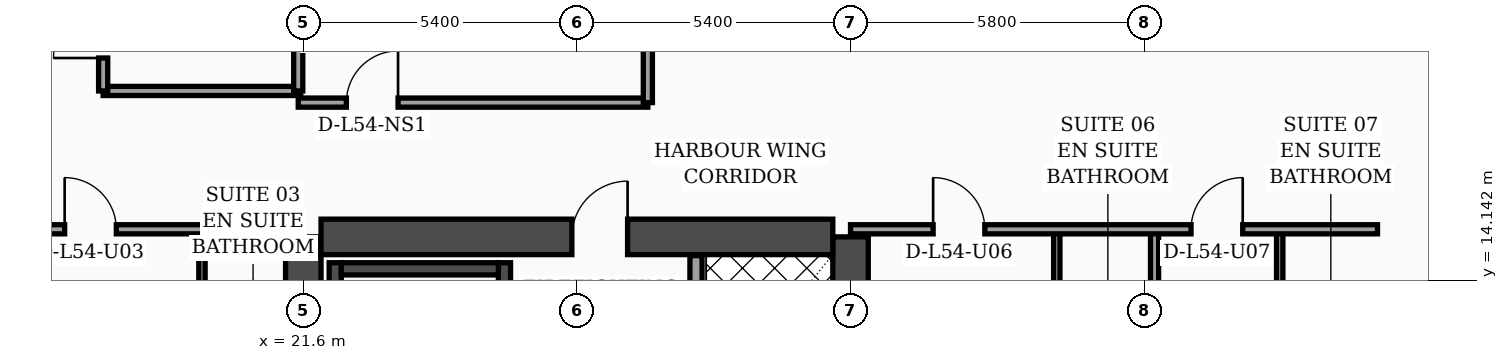
"""IFC4 building model, lengths in metres.
Left out: names, types, materials, properties, quantities, classifications, styles, units other than length and angle.
Written with IfcOpenShell. Run it as: python <this file> out.ifc"""

import sys

from ifc_helpers import new_model, si_unit, direction, frame, frame_2d, origin, place, context, subcontext, project, spatial, rectangle, extrude, element, fill, save


model = new_model("IFC4")
c1 = context("Model", 3, precision=1e-05, world=origin(), true_north=direction((0.0, 1.0)))
c2 = subcontext(c1, "Body", "Model", "MODEL_VIEW")
j1 = project(units=[si_unit("LENGTHUNIT", "METRE"), si_unit("PLANEANGLEUNIT", "RADIAN")], contexts=[c1])
p1 = place(None, origin())
s1 = spatial("IfcSite", under=j1, at=p1, CompositionType="ELEMENT")
p2 = place(p1, origin())
s2 = spatial("IfcBuilding", under=s1, at=p2, CompositionType="ELEMENT")
p3 = place(p2, frame((0.0, 0.0, 219.3)))
s3 = spatial("IfcBuildingStorey", under=s2, at=p3, CompositionType="ELEMENT", Elevation=219.3)
for number, where, z_axis, x_axis in (
    (1, (21.6, 4.6, 0.0), (0.0, 0.0, 1.0), (0.0, 1.0, 0.0)),
    (2, (32.4, 4.6, 0.0), (0.0, 0.0, 1.0), (0.0, 1.0, 0.0)),
):
    element("IfcWall", number, at=place(p3, frame(where, z_axis=z_axis, x_axis=x_axis)), inside=s3, PredefinedType="SHEAR", context=c2, shape_type="SweptSolid", body=[
        extrude(rectangle(XDim=10.4, YDim=0.7, at=frame_2d((5.2, 0.0))), origin(), (0.0, 0.0, 1.0), 3.56),
    ])
p4 = place(p3, frame((21.95, 15.0, 0.0), z_axis=(0.0, 0.0, 1.0), x_axis=(1.0, 0.0, 0.0)))
e3 = element("IfcWall", 3, at=p4, inside=s3, PredefinedType="SHEAR", context=c2, shape_type="SweptSolid", body=[
    extrude(rectangle(XDim=10.1, YDim=0.7, at=frame_2d((5.05, 0.0))), origin(), (0.0, 0.0, 1.0), 3.56),
])
p5 = place(p4, frame((4.95, 0.0, 0.0)))
e4 = element("IfcOpeningElement", 4, at=p5, cuts=e3, PredefinedType="OPENING", context=c2, shape_type="SweptSolid", body=[
    extrude(rectangle(XDim=1.1, YDim=2.2, at=frame_2d((0.55, 1.1))), frame((0.0, 0.36, 0.0), z_axis=(0.0, -1.0, 0.0), x_axis=(1.0, 0.0, 0.0)), (0.0, 0.0, 1.0), 0.72),
])
p6 = place(p3, frame((22.23, 4.95, 0.0), z_axis=(0.0, 0.0, 1.0), x_axis=(0.0, 1.0, 0.0)))
e5 = element("IfcWall", 5, at=p6, inside=s3, PredefinedType="SOLIDWALL", context=c2, shape_type="SweptSolid", body=[
    extrude(rectangle(XDim=9.54, YDim=0.24, at=frame_2d((4.77, 0.0))), origin(), (0.0, 0.0, 1.0), 3.56),
])
p7 = place(p3, frame((25.57, 4.95, 0.0), z_axis=(0.0, 0.0, 1.0), x_axis=(0.0, 1.0, 0.0)))
e6 = element("IfcWall", 6, at=p7, inside=s3, PredefinedType="SOLIDWALL", context=c2, shape_type="SweptSolid", body=[
    extrude(rectangle(XDim=9.54, YDim=0.24, at=frame_2d((4.77, 0.0))), origin(), (0.0, 0.0, 1.0), 3.56),
])
p8 = place(p7, frame((0.35, 0.0, 0.0)))
e7 = element("IfcOpeningElement", 7, at=p8, cuts=e6, PredefinedType="OPENING", context=c2, shape_type="SweptSolid", body=[
    extrude(rectangle(XDim=1.15, YDim=2.2, at=frame_2d((0.575, 1.1))), frame((0.0, 0.13, 0.0), z_axis=(0.0, -1.0, 0.0), x_axis=(1.0, 0.0, 0.0)), (0.0, 0.0, 1.0), 0.26),
])
p9 = place(p3, frame((22.35, 14.37, 0.0), z_axis=(0.0, 0.0, 1.0), x_axis=(1.0, 0.0, 0.0)))
e8 = element("IfcWall", 8, at=p9, inside=s3, PredefinedType="SOLIDWALL", context=c2, shape_type="SweptSolid", body=[
    extrude(rectangle(XDim=3.1, YDim=0.24, at=frame_2d((1.55, 0.0))), origin(), (0.0, 0.0, 1.0), 3.56),
])
p10 = place(p3, frame((49.43, 5.505, 0.0), z_axis=(0.0, 0.0, 1.0), x_axis=(-0.300509063924, 0.953778958931, 0.0)))
e9 = element("IfcWall", 9, at=p10, inside=s3, PredefinedType="SOLIDWALL", context=c2, shape_type="SweptSolid", body=[
    extrude(rectangle(XDim=30.814, YDim=0.32, at=frame_2d((15.407, 0.0))), origin(), (0.0, 0.0, 1.0), 3.56),
])
p11 = place(p10, frame((8.9, 0.0, 0.0)))
e10 = element("IfcOpeningElement", 10, at=p11, cuts=e9, PredefinedType="OPENING", context=c2, shape_type="SweptSolid", body=[
    extrude(rectangle(XDim=1.4, YDim=2.25, at=frame_2d((0.7, 1.125))), frame((0.0, 0.17, 0.0), z_axis=(0.0, -1.0, 0.0), x_axis=(1.0, 0.0, 0.0)), (0.0, 0.0, 1.0), 0.34),
])
p12 = place(p10, frame((4.437, 0.0, 0.7)))
e11 = element("IfcOpeningElement", 11, at=p12, cuts=e9, PredefinedType="OPENING", context=c2, shape_type="SweptSolid", body=[
    extrude(rectangle(XDim=1.6, YDim=1.65, at=frame_2d((0.8, 0.825))), frame((0.0, 0.17, 0.0), z_axis=(0.0, -1.0, 0.0), x_axis=(1.0, 0.0, 0.0)), (0.0, 0.0, 1.0), 0.34),
])
p13 = place(p10, frame((18.696, 0.0, 0.7)))
e12 = element("IfcOpeningElement", 12, at=p13, cuts=e9, PredefinedType="OPENING", context=c2, shape_type="SweptSolid", body=[
    extrude(rectangle(XDim=1.6, YDim=1.65, at=frame_2d((0.8, 0.825))), frame((0.0, 0.17, 0.0), z_axis=(0.0, -1.0, 0.0), x_axis=(1.0, 0.0, 0.0)), (0.0, 0.0, 1.0), 0.34),
])
p14 = place(p10, frame((1.6, 0.0, 0.75)))
e13 = element("IfcOpeningElement", 13, at=p14, cuts=e9, PredefinedType="OPENING", context=c2, shape_type="SweptSolid", body=[
    extrude(rectangle(XDim=1.5, YDim=1.6, at=frame_2d((0.75, 0.8))), frame((0.0, 0.17, 0.0), z_axis=(0.0, -1.0, 0.0), x_axis=(1.0, 0.0, 0.0)), (0.0, 0.0, 1.0), 0.34),
])
p15 = place(p10, frame((6.75, 0.0, 0.75)))
e14 = element("IfcOpeningElement", 14, at=p15, cuts=e9, PredefinedType="OPENING", context=c2, shape_type="SweptSolid", body=[
    extrude(rectangle(XDim=1.5, YDim=1.6, at=frame_2d((0.75, 0.8))), frame((0.0, 0.17, 0.0), z_axis=(0.0, -1.0, 0.0), x_axis=(1.0, 0.0, 0.0)), (0.0, 0.0, 1.0), 0.34),
])
p16 = place(p10, frame((10.9, 0.0, 0.75)))
e15 = element("IfcOpeningElement", 15, at=p16, cuts=e9, PredefinedType="OPENING", context=c2, shape_type="SweptSolid", body=[
    extrude(rectangle(XDim=1.5, YDim=1.6, at=frame_2d((0.75, 0.8))), frame((0.0, 0.17, 0.0), z_axis=(0.0, -1.0, 0.0), x_axis=(1.0, 0.0, 0.0)), (0.0, 0.0, 1.0), 0.34),
])
p17 = place(p10, frame((14.0, 0.0, 0.75)))
e16 = element("IfcOpeningElement", 16, at=p17, cuts=e9, PredefinedType="OPENING", context=c2, shape_type="SweptSolid", body=[
    extrude(rectangle(XDim=1.5, YDim=1.6, at=frame_2d((0.75, 0.8))), frame((0.0, 0.17, 0.0), z_axis=(0.0, -1.0, 0.0), x_axis=(1.0, 0.0, 0.0)), (0.0, 0.0, 1.0), 0.34),
])
p18 = place(p10, frame((16.55, 0.0, 0.75)))
e17 = element("IfcOpeningElement", 17, at=p18, cuts=e9, PredefinedType="OPENING", context=c2, shape_type="SweptSolid", body=[
    extrude(rectangle(XDim=1.5, YDim=1.6, at=frame_2d((0.75, 0.8))), frame((0.0, 0.17, 0.0), z_axis=(0.0, -1.0, 0.0), x_axis=(1.0, 0.0, 0.0)), (0.0, 0.0, 1.0), 0.34),
])
p19 = place(p10, frame((20.75, 0.0, 0.75)))
e18 = element("IfcOpeningElement", 18, at=p19, cuts=e9, PredefinedType="OPENING", context=c2, shape_type="SweptSolid", body=[
    extrude(rectangle(XDim=1.5, YDim=1.6, at=frame_2d((0.75, 0.8))), frame((0.0, 0.17, 0.0), z_axis=(0.0, -1.0, 0.0), x_axis=(1.0, 0.0, 0.0)), (0.0, 0.0, 1.0), 0.34),
])
p20 = place(p10, frame((23.3, 0.0, 0.75)))
e19 = element("IfcOpeningElement", 19, at=p20, cuts=e9, PredefinedType="OPENING", context=c2, shape_type="SweptSolid", body=[
    extrude(rectangle(XDim=1.5, YDim=1.6, at=frame_2d((0.75, 0.8))), frame((0.0, 0.17, 0.0), z_axis=(0.0, -1.0, 0.0), x_axis=(1.0, 0.0, 0.0)), (0.0, 0.0, 1.0), 0.34),
])
p21 = place(p10, frame((26.4, 0.0, 0.75)))
e20 = element("IfcOpeningElement", 20, at=p21, cuts=e9, PredefinedType="OPENING", context=c2, shape_type="SweptSolid", body=[
    extrude(rectangle(XDim=1.5, YDim=1.6, at=frame_2d((0.75, 0.8))), frame((0.0, 0.17, 0.0), z_axis=(0.0, -1.0, 0.0), x_axis=(1.0, 0.0, 0.0)), (0.0, 0.0, 1.0), 0.34),
])
p22 = place(p3, frame((29.35, 4.97, 0.0), z_axis=(0.0, 0.0, 1.0), x_axis=(0.0, 1.0, 0.0)))
e21 = element("IfcWall", 21, at=p22, inside=s3, PredefinedType="SOLIDWALL", context=c2, shape_type="SweptSolid", body=[
    extrude(rectangle(XDim=9.66, YDim=0.24, at=frame_2d((4.83, 0.0))), origin(), (0.0, 0.0, 1.0), 3.56),
])
p23 = place(p22, frame((0.55, 0.0, 0.0)))
e22 = element("IfcOpeningElement", 22, at=p23, cuts=e21, PredefinedType="OPENING", context=c2, shape_type="SweptSolid", body=[
    extrude(rectangle(XDim=1.3, YDim=2.35, at=frame_2d((0.65, 1.175))), frame((0.0, 0.13, 0.0), z_axis=(0.0, -1.0, 0.0), x_axis=(1.0, 0.0, 0.0)), (0.0, 0.0, 1.0), 0.26),
])
p24 = place(p3, frame((19.6, 2.44, 0.0), z_axis=(0.0, 0.0, 1.0), x_axis=(0.0, 1.0, 0.0)))
e23 = element("IfcWall", 23, at=p24, inside=s3, PredefinedType="PARTITIONING", context=c2, shape_type="SweptSolid", body=[
    extrude(rectangle(XDim=12.71, YDim=0.125, at=frame_2d((6.355, 0.0))), origin(), (0.0, 0.0, 1.0), 2.59),
])
p25 = place(p24, frame((4.34, 0.0, 0.0)))
e24 = element("IfcOpeningElement", 24, at=p25, cuts=e23, PredefinedType="OPENING", context=c2, shape_type="SweptSolid", body=[
    extrude(rectangle(XDim=0.96, YDim=2.2, at=frame_2d((0.48, 1.1))), frame((0.0, 0.073, 0.0), z_axis=(0.0, -1.0, 0.0), x_axis=(1.0, 0.0, 0.0)), (0.0, 0.0, 1.0), 0.145),
])
p26 = place(p24, frame((10.18, 0.0, 0.0)))
e25 = element("IfcOpeningElement", 25, at=p26, cuts=e23, PredefinedType="OPENING", context=c2, shape_type="SweptSolid", body=[
    extrude(rectangle(XDim=0.9, YDim=2.15, at=frame_2d((0.45, 1.075))), frame((0.0, 0.073, 0.0), z_axis=(0.0, -1.0, 0.0), x_axis=(1.0, 0.0, 0.0)), (0.0, 0.0, 1.0), 0.145),
])
p27 = place(p3, frame((15.15, 15.15, 0.0), z_axis=(0.0, 0.0, 1.0), x_axis=(1.0, 0.0, 0.0)))
e26 = element("IfcWall", 26, at=p27, inside=s3, PredefinedType="PARTITIONING", context=c2, shape_type="SweptSolid", body=[
    extrude(rectangle(XDim=6.45, YDim=0.18, at=frame_2d((3.225, 0.0))), origin(), (0.0, 0.0, 1.0), 2.59),
])
p28 = place(p27, frame((1.74, 0.0, 0.0)))
e27 = element("IfcOpeningElement", 27, at=p28, cuts=e26, PredefinedType="OPENING", context=c2, shape_type="SweptSolid", body=[
    extrude(rectangle(XDim=1.02, YDim=2.2, at=frame_2d((0.51, 1.1))), frame((0.0, 0.1, 0.0), z_axis=(0.0, -1.0, 0.0), x_axis=(1.0, 0.0, 0.0)), (0.0, 0.0, 1.0), 0.2),
])
p29 = place(p3, frame((17.65, 17.88, 0.0), z_axis=(0.0, 0.0, 1.0), x_axis=(1.0, 0.0, 0.0)))
e28 = element("IfcWall", 28, at=p29, inside=s3, PredefinedType="PARTITIONING", context=c2, shape_type="SweptSolid", body=[
    extrude(rectangle(XDim=3.9, YDim=0.18, at=frame_2d((1.95, 0.0))), origin(), (0.0, 0.0, 1.0), 3.09),
])
p30 = place(p3, frame((21.5, 17.88, 0.0), z_axis=(0.0, 0.0, 1.0), x_axis=(0.0, 1.0, 0.0)))
e29 = element("IfcWall", 29, at=p30, inside=s3, PredefinedType="PARTITIONING", context=c2, shape_type="SweptSolid", body=[
    extrude(rectangle(XDim=6.44, YDim=0.18, at=frame_2d((3.22, 0.0))), origin(), (0.0, 0.0, 1.0), 3.09),
])
p31 = place(p3, frame((17.65, 17.88, 0.0), z_axis=(0.0, 0.0, 1.0), x_axis=(0.0, 1.0, 0.0)))
e30 = element("IfcWall", 30, at=p31, inside=s3, PredefinedType="PARTITIONING", context=c2, shape_type="SweptSolid", body=[
    extrude(rectangle(XDim=6.44, YDim=0.18, at=frame_2d((3.22, 0.0))), origin(), (0.0, 0.0, 1.0), 3.09),
])
p32 = place(p31, frame((0.65, 0.0, 0.0)))
e31 = element("IfcOpeningElement", 31, at=p32, cuts=e30, PredefinedType="OPENING", context=c2, shape_type="SweptSolid", body=[
    extrude(rectangle(XDim=0.98, YDim=2.15, at=frame_2d((0.49, 1.075))), frame((0.0, 0.1, 0.0), z_axis=(0.0, -1.0, 0.0), x_axis=(1.0, 0.0, 0.0)), (0.0, 0.0, 1.0), 0.2),
])
p33 = place(p31, frame((3.97, 0.0, 0.0)))
e32 = element("IfcOpeningElement", 32, at=p33, cuts=e30, PredefinedType="OPENING", context=c2, shape_type="SweptSolid", body=[
    extrude(rectangle(XDim=0.96, YDim=2.2, at=frame_2d((0.48, 1.1))), frame((0.0, 0.1, 0.0), z_axis=(0.0, -1.0, 0.0), x_axis=(1.0, 0.0, 0.0)), (0.0, 0.0, 1.0), 0.2),
])
p34 = place(p3, frame((36.47, 2.44, 0.0), z_axis=(0.0, 0.0, 1.0), x_axis=(0.0, 1.0, 0.0)))
e33 = element("IfcWall", 33, at=p34, inside=s3, PredefinedType="PARTITIONING", context=c2, shape_type="SweptSolid", body=[
    extrude(rectangle(XDim=12.71, YDim=0.125, at=frame_2d((6.355, 0.0))), origin(), (0.0, 0.0, 1.0), 2.94),
])
p35 = place(p34, frame((4.35, 0.0, 0.0)))
e34 = element("IfcOpeningElement", 34, at=p35, cuts=e33, PredefinedType="OPENING", context=c2, shape_type="SweptSolid", body=[
    extrude(rectangle(XDim=0.96, YDim=2.2, at=frame_2d((0.48, 1.1))), frame((0.0, 0.073, 0.0), z_axis=(0.0, -1.0, 0.0), x_axis=(1.0, 0.0, 0.0)), (0.0, 0.0, 1.0), 0.145),
])
p36 = place(p34, frame((10.21, 0.0, 0.0)))
e35 = element("IfcOpeningElement", 35, at=p36, cuts=e33, PredefinedType="OPENING", context=c2, shape_type="SweptSolid", body=[
    extrude(rectangle(XDim=0.9, YDim=2.15, at=frame_2d((0.45, 1.075))), frame((0.0, 0.073, 0.0), z_axis=(0.0, -1.0, 0.0), x_axis=(1.0, 0.0, 0.0)), (0.0, 0.0, 1.0), 0.145),
])
p37 = place(p3, frame((40.87, 2.44, 0.0), z_axis=(0.0, 0.0, 1.0), x_axis=(0.0, 1.0, 0.0)))
e36 = element("IfcWall", 36, at=p37, inside=s3, PredefinedType="PARTITIONING", context=c2, shape_type="SweptSolid", body=[
    extrude(rectangle(XDim=12.71, YDim=0.125, at=frame_2d((6.355, 0.0))), origin(), (0.0, 0.0, 1.0), 2.94),
])
p38 = place(p37, frame((4.35, 0.0, 0.0)))
e37 = element("IfcOpeningElement", 37, at=p38, cuts=e36, PredefinedType="OPENING", context=c2, shape_type="SweptSolid", body=[
    extrude(rectangle(XDim=0.96, YDim=2.2, at=frame_2d((0.48, 1.1))), frame((0.0, 0.073, 0.0), z_axis=(0.0, -1.0, 0.0), x_axis=(1.0, 0.0, 0.0)), (0.0, 0.0, 1.0), 0.145),
])
p39 = place(p37, frame((10.21, 0.0, 0.0)))
e38 = element("IfcOpeningElement", 38, at=p39, cuts=e36, PredefinedType="OPENING", context=c2, shape_type="SweptSolid", body=[
    extrude(rectangle(XDim=0.9, YDim=2.15, at=frame_2d((0.45, 1.075))), frame((0.0, 0.073, 0.0), z_axis=(0.0, -1.0, 0.0), x_axis=(1.0, 0.0, 0.0)), (0.0, 0.0, 1.0), 0.145),
])
p40 = place(p3, frame((38.4, 2.44, 0.0), z_axis=(0.0, 0.0, 1.0), x_axis=(0.0, 1.0, 0.0)))
e39 = element("IfcWall", 39, at=p40, inside=s3, PredefinedType="PARTITIONING", context=c2, shape_type="SweptSolid", body=[
    extrude(rectangle(XDim=12.71, YDim=0.16, at=frame_2d((6.355, 0.0))), origin(), (0.0, 0.0, 1.0), 2.94),
])
p41 = place(p3, frame((32.4, 15.15, 0.0), z_axis=(0.0, 0.0, 1.0), x_axis=(1.0, 0.0, 0.0)))
e40 = element("IfcWall", 40, at=p41, inside=s3, PredefinedType="PARTITIONING", context=c2, shape_type="SweptSolid", body=[
    extrude(rectangle(XDim=10.4, YDim=0.18, at=frame_2d((5.2, 0.0))), origin(), (0.0, 0.0, 1.0), 2.94),
])
p42 = place(p41, frame((1.63, 0.0, 0.0)))
e41 = element("IfcOpeningElement", 41, at=p42, cuts=e40, PredefinedType="OPENING", context=c2, shape_type="SweptSolid", body=[
    extrude(rectangle(XDim=1.02, YDim=2.2, at=frame_2d((0.51, 1.1))), frame((0.0, 0.1, 0.0), z_axis=(0.0, -1.0, 0.0), x_axis=(1.0, 0.0, 0.0)), (0.0, 0.0, 1.0), 0.2),
])
p43 = place(p41, frame((6.72, 0.0, 0.0)))
e42 = element("IfcOpeningElement", 42, at=p43, cuts=e40, PredefinedType="OPENING", context=c2, shape_type="SweptSolid", body=[
    extrude(rectangle(XDim=1.02, YDim=2.2, at=frame_2d((0.51, 1.1))), frame((0.0, 0.1, 0.0), z_axis=(0.0, -1.0, 0.0), x_axis=(1.0, 0.0, 0.0)), (0.0, 0.0, 1.0), 0.2),
])
p44 = place(p3, frame((21.5, 17.65, 0.0), z_axis=(0.0, 0.0, 1.0), x_axis=(1.0, 0.0, 0.0)))
e43 = element("IfcWall", 43, at=p44, inside=s3, PredefinedType="PARTITIONING", context=c2, shape_type="SweptSolid", body=[
    extrude(rectangle(XDim=6.9, YDim=0.18, at=frame_2d((3.45, 0.0))), origin(), (0.0, 0.0, 1.0), 2.94),
])
p45 = place(p44, frame((0.95, 0.0, 0.0)))
e44 = element("IfcOpeningElement", 44, at=p45, cuts=e43, PredefinedType="OPENING", context=c2, shape_type="SweptSolid", body=[
    extrude(rectangle(XDim=1.02, YDim=2.2, at=frame_2d((0.51, 1.1))), frame((0.0, 0.1, 0.0), z_axis=(0.0, -1.0, 0.0), x_axis=(1.0, 0.0, 0.0)), (0.0, 0.0, 1.0), 0.2),
])
p46 = place(p3, frame((28.4, 17.65, 0.0), z_axis=(0.0, 0.0, 1.0), x_axis=(0.0, 1.0, 0.0)))
e45 = element("IfcWall", 45, at=p46, inside=s3, PredefinedType="PARTITIONING", context=c2, shape_type="SweptSolid", body=[
    extrude(rectangle(XDim=13.16, YDim=0.18, at=frame_2d((6.58, 0.0))), origin(), (0.0, 0.0, 1.0), 2.94),
])
p47 = place(p28, origin())
e46 = element("IfcDoor", 46, at=p47, inside=s3, OperationType="SINGLE_SWING_LEFT", PredefinedType="DOOR", context=c2, shape_type="SweptSolid", body=[
    extrude(rectangle(XDim=1.02, YDim=2.2, at=frame_2d((0.51, 1.1))), frame((0.0, 0.025, 0.0), z_axis=(0.0, -1.0, 0.0), x_axis=(1.0, 0.0, 0.0)), (0.0, 0.0, 1.0), 0.05),
])
fill(e27, e46)
p48 = place(p32, origin())
e47 = element("IfcDoor", 47, at=p48, inside=s3, OperationType="SINGLE_SWING_LEFT", PredefinedType="DOOR", context=c2, shape_type="SweptSolid", body=[
    extrude(rectangle(XDim=0.98, YDim=2.15, at=frame_2d((0.49, 1.075))), frame((0.0, 0.025, 0.0), z_axis=(0.0, -1.0, 0.0), x_axis=(1.0, 0.0, 0.0)), (0.0, 0.0, 1.0), 0.05),
])
fill(e31, e47)
p49 = place(p42, origin())
e48 = element("IfcDoor", 48, at=p49, inside=s3, OperationType="SINGLE_SWING_LEFT", PredefinedType="DOOR", context=c2, shape_type="SweptSolid", body=[
    extrude(rectangle(XDim=1.02, YDim=2.2, at=frame_2d((0.51, 1.1))), frame((0.0, 0.025, 0.0), z_axis=(0.0, -1.0, 0.0), x_axis=(1.0, 0.0, 0.0)), (0.0, 0.0, 1.0), 0.05),
])
fill(e41, e48)
p50 = place(p43, origin())
e49 = element("IfcDoor", 49, at=p50, inside=s3, OperationType="SINGLE_SWING_RIGHT", PredefinedType="DOOR", context=c2, shape_type="SweptSolid", body=[
    extrude(rectangle(XDim=1.02, YDim=2.2, at=frame_2d((0.51, 1.1))), frame((0.0, 0.025, 0.0), z_axis=(0.0, -1.0, 0.0), x_axis=(1.0, 0.0, 0.0)), (0.0, 0.0, 1.0), 0.05),
])
fill(e42, e49)
p51 = place(p45, origin())
e50 = element("IfcDoor", 50, at=p51, inside=s3, OperationType="SINGLE_SWING_RIGHT", PredefinedType="DOOR", context=c2, shape_type="SweptSolid", body=[
    extrude(rectangle(XDim=1.02, YDim=2.2, at=frame_2d((0.51, 1.1))), frame((0.0, 0.025, 0.0), z_axis=(0.0, -1.0, 0.0), x_axis=(1.0, 0.0, 0.0)), (0.0, 0.0, 1.0), 0.05),
])
fill(e44, e50)
p52 = place(p5, origin())
e51 = element("IfcDoor", 51, at=p52, inside=s3, OperationType="SINGLE_SWING_RIGHT", PredefinedType="DOOR", context=c2, shape_type="SweptSolid", body=[
    extrude(rectangle(XDim=1.1, YDim=2.2, at=frame_2d((0.55, 1.1))), frame((0.0, 0.025, 0.0), z_axis=(0.0, -1.0, 0.0), x_axis=(1.0, 0.0, 0.0)), (0.0, 0.0, 1.0), 0.05),
])
fill(e4, e51)
save(model, sys.argv[1])
